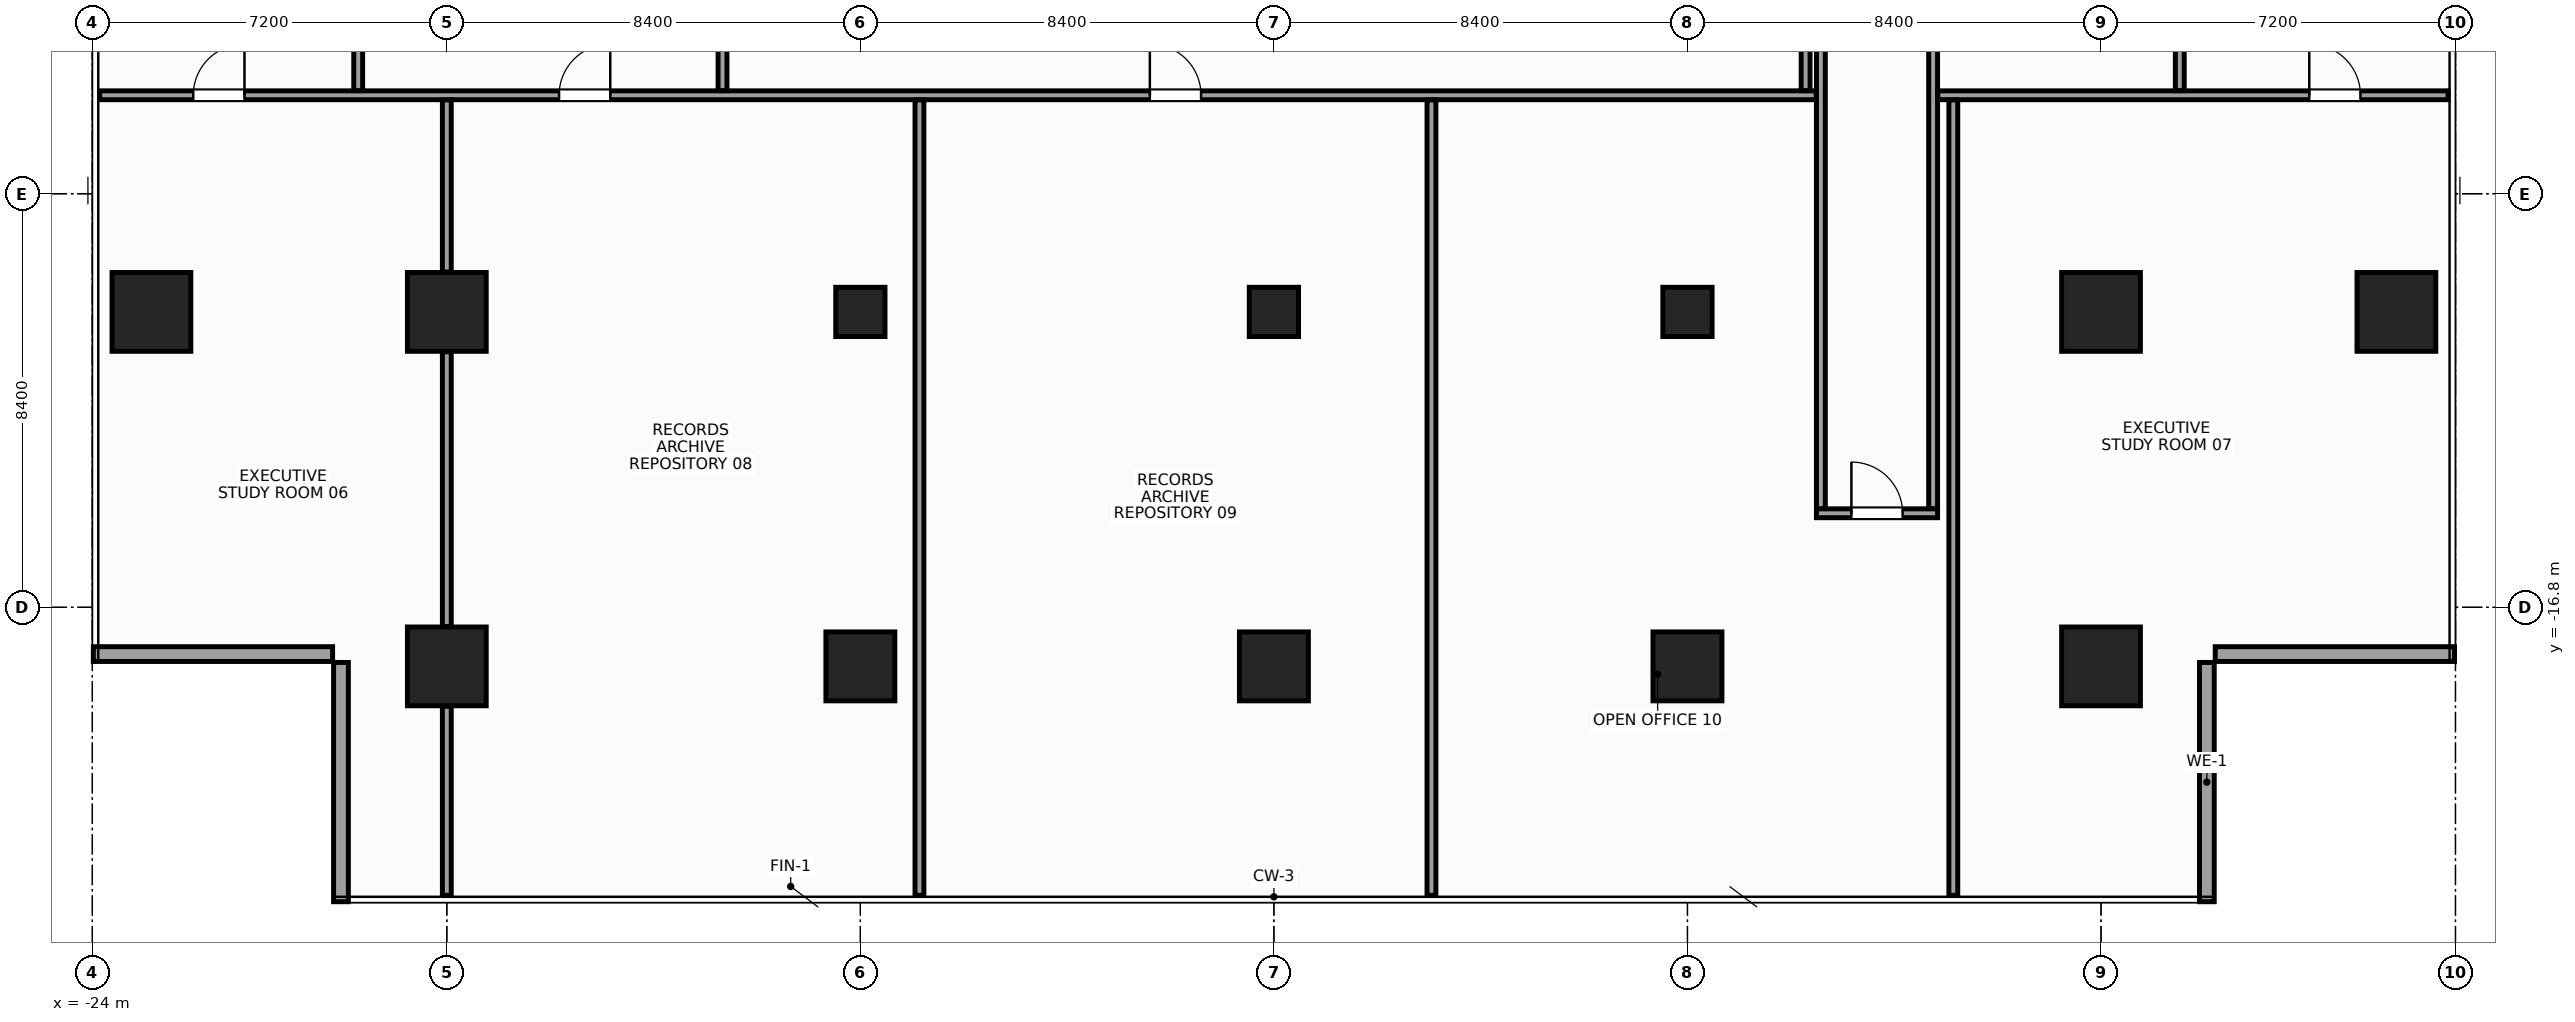
"""IFC4 building model, lengths in metres.
Left out: names, types, materials, properties, quantities, classifications, styles, units other than length and angle.
Written with IfcOpenShell. Run it as: python <this file> out.ifc"""

import sys

from ifc_helpers import new_model, si_unit, direction, frame, frame_2d, origin, origin_2d, place, context, subcontext, project, spatial, rectangle, hollow_rectangle, extrude, source, transform, mapped, element, fill, save


model = new_model("IFC4")
c1 = context("Model", 3, precision=1e-05, world=origin(), true_north=direction((0.0, 1.0)))
c2 = subcontext(c1, "Body", "Model", "MODEL_VIEW")
j1 = project(units=[si_unit("LENGTHUNIT", "METRE"), si_unit("PLANEANGLEUNIT", "RADIAN")], contexts=[c1])
p1 = place(None, origin())
s1 = spatial("IfcSite", under=j1, at=p1, CompositionType="ELEMENT")
p2 = place(p1, origin())
s2 = spatial("IfcBuilding", under=s1, at=p2, CompositionType="ELEMENT")
p3 = place(p2, frame((0.0, 0.0, 167.6)))
s3 = spatial("IfcBuildingStorey", under=s2, at=p3, CompositionType="ELEMENT", Elevation=167.6)
m1 = source(origin(), c2, "Body", "SweptSolid", [
    extrude(rectangle(XDim=1.6, YDim=1.6, at=origin_2d()), origin(), (0.0, 0.0, 1.0), 3.6),
])
for number, where, z_axis, x_axis in (
    (1, (-16.8, -18.0, 0.0), (0.0, 0.0, 1.0), (1.0, 0.0, 0.0)),
    (2, (-16.8, -10.8, 0.0), (0.0, 0.0, 1.0), (1.0, 0.0, 0.0)),
    (3, (16.8, -18.0, 0.0), (0.0, 0.0, 1.0), (1.0, 0.0, 0.0)),
    (4, (16.8, -10.8, 0.0), (0.0, 0.0, 1.0), (1.0, 0.0, 0.0)),
    (5, (-22.8, -10.8, 0.0), (0.0, 0.0, 1.0), (1.0, 0.0, 0.0)),
    (6, (22.8, -10.8, 0.0), (0.0, 0.0, 1.0), (1.0, 0.0, 0.0)),
):
    element("IfcColumn", number, at=place(p3, frame(where, z_axis=z_axis, x_axis=x_axis)), inside=s3, PredefinedType="COLUMN", context=c2, shape_type="MappedRepresentation", body=[
        mapped(m1, transform((0.0, 0.0, 0.0), x_axis=(1.0, 0.0, 0.0), y_axis=(0.0, 1.0, 0.0), z_axis=(0.0, 0.0, 1.0), scale=1.0)),
    ])
m2 = source(origin(), c2, "Body", "SweptSolid", [
    extrude(rectangle(XDim=1.4, YDim=1.4, at=origin_2d()), origin(), (0.0, 0.0, 1.0), 3.6),
])
p4 = place(p3, frame((-8.4, -18.0, 0.0), z_axis=(0.0, 0.0, 1.0), x_axis=(1.0, 0.0, 0.0)))
e7 = element("IfcColumn", 7, at=p4, inside=s3, PredefinedType="COLUMN", context=c2, shape_type="MappedRepresentation", body=[
    mapped(m2, transform((0.0, 0.0, 0.0), x_axis=(1.0, 0.0, 0.0), y_axis=(0.0, 1.0, 0.0), z_axis=(0.0, 0.0, 1.0), scale=1.0)),
])
m3 = source(origin(), c2, "Body", "SweptSolid", [
    extrude(hollow_rectangle(XDim=1.0, YDim=1.0, WallThickness=0.045, at=origin_2d()), origin(), (0.0, 0.0, 1.0), 3.6),
])
p5 = place(p3, frame((-8.4, -10.8, 0.0), z_axis=(0.0, 0.0, 1.0), x_axis=(1.0, 0.0, 0.0)))
e8 = element("IfcColumn", 8, at=p5, inside=s3, PredefinedType="COLUMN", context=c2, shape_type="MappedRepresentation", body=[
    mapped(m3, transform((0.0, 0.0, 0.0), x_axis=(1.0, 0.0, 0.0), y_axis=(0.0, 1.0, 0.0), z_axis=(0.0, 0.0, 1.0), scale=1.0)),
])
p6 = place(p3, frame((8.4, -18.0, 0.0), z_axis=(0.0, 0.0, 1.0), x_axis=(1.0, 0.0, 0.0)))
e9 = element("IfcColumn", 9, at=p6, inside=s3, PredefinedType="COLUMN", context=c2, shape_type="MappedRepresentation", body=[
    mapped(m2, transform((0.0, 0.0, 0.0), x_axis=(1.0, 0.0, 0.0), y_axis=(0.0, 1.0, 0.0), z_axis=(0.0, 0.0, 1.0), scale=1.0)),
])
p7 = place(p3, frame((8.4, -10.8, 0.0), z_axis=(0.0, 0.0, 1.0), x_axis=(1.0, 0.0, 0.0)))
e10 = element("IfcColumn", 10, at=p7, inside=s3, PredefinedType="COLUMN", context=c2, shape_type="MappedRepresentation", body=[
    mapped(m3, transform((0.0, 0.0, 0.0), x_axis=(1.0, 0.0, 0.0), y_axis=(0.0, 1.0, 0.0), z_axis=(0.0, 0.0, 1.0), scale=1.0)),
])
p8 = place(p3, frame((0.0, -18.0, 0.0), z_axis=(0.0, 0.0, 1.0), x_axis=(1.0, 0.0, 0.0)))
e11 = element("IfcColumn", 11, at=p8, inside=s3, PredefinedType="COLUMN", context=c2, shape_type="MappedRepresentation", body=[
    mapped(m2, transform((0.0, 0.0, 0.0), x_axis=(1.0, 0.0, 0.0), y_axis=(0.0, 1.0, 0.0), z_axis=(0.0, 0.0, 1.0), scale=1.0)),
])
m4 = source(origin(), c2, "Body", "SweptSolid", [
    extrude(rectangle(XDim=1.0, YDim=1.0, at=origin_2d()), origin(), (0.0, 0.0, 1.0), 3.6),
])
p9 = place(p3, frame((0.0, -10.8, 0.0), z_axis=(0.0, 0.0, 1.0), x_axis=(1.0, 0.0, 0.0)))
e12 = element("IfcColumn", 12, at=p9, inside=s3, PredefinedType="COLUMN", context=c2, shape_type="MappedRepresentation", body=[
    mapped(m4, transform((0.0, 0.0, 0.0), x_axis=(1.0, 0.0, 0.0), y_axis=(0.0, 1.0, 0.0), z_axis=(0.0, 0.0, 1.0), scale=1.0)),
])
m5 = source(origin(), c2, "Body", "SweptSolid", [
    extrude(rectangle(XDim=4.86, YDim=0.3, at=frame_2d((2.43, 0.0))), origin(), (0.0, 0.0, 1.0), 2.76),
])
p10 = place(p3, frame((18.95, -22.78, 0.0), z_axis=(0.0, 0.0, 1.0), x_axis=(0.0, 1.0, 0.0)))
e13 = element("IfcWall", 13, at=p10, inside=s3, PredefinedType="STANDARD", context=c2, shape_type="MappedRepresentation", body=[
    mapped(m5, transform((0.0, 0.0, 0.0), x_axis=(1.0, 0.0, 0.0), y_axis=(0.0, 1.0, 0.0), z_axis=(0.0, 0.0, 1.0), scale=1.0)),
])
m6 = source(origin(), c2, "Body", "SweptSolid", [
    extrude(rectangle(XDim=4.86, YDim=0.3, at=frame_2d((2.43, 0.0))), origin(), (0.0, 0.0, 1.0), 2.76),
])
for number, where, z_axis, x_axis in (
    (14, (19.12, -17.75, 0.0), (0.0, 0.0, 1.0), (1.0, 0.0, 0.0)),
    (15, (-23.98, -17.75, 0.0), (0.0, 0.0, 1.0), (1.0, 0.0, 0.0)),
):
    element("IfcWall", number, at=place(p3, frame(where, z_axis=z_axis, x_axis=x_axis)), inside=s3, PredefinedType="STANDARD", context=c2, shape_type="MappedRepresentation", body=[
        mapped(m6, transform((0.0, 0.0, 0.0), x_axis=(1.0, 0.0, 0.0), y_axis=(0.0, 1.0, 0.0), z_axis=(0.0, 0.0, 1.0), scale=1.0)),
    ])
p11 = place(p3, frame((-18.95, -17.92, 0.0), z_axis=(0.0, 0.0, 1.0), x_axis=(0.0, -1.0, 0.0)))
e16 = element("IfcWall", 16, at=p11, inside=s3, PredefinedType="STANDARD", context=c2, shape_type="MappedRepresentation", body=[
    mapped(m5, transform((0.0, 0.0, 0.0), x_axis=(1.0, 0.0, 0.0), y_axis=(0.0, 1.0, 0.0), z_axis=(0.0, 0.0, 1.0), scale=1.0)),
])
m7 = source(origin(), c2, "Body", "SweptSolid", [
    extrude(rectangle(XDim=2.46, YDim=0.18, at=frame_2d((1.23, 0.0))), origin(), (0.0, 0.0, 1.0), 3.38),
])
p12 = place(p3, frame((11.02, -14.89, 0.0), z_axis=(0.0, 0.0, 1.0), x_axis=(1.0, 0.0, 0.0)))
e17 = element("IfcWall", 17, at=p12, inside=s3, PredefinedType="PARTITIONING", context=c2, shape_type="MappedRepresentation", body=[
    mapped(m7, transform((0.0, 0.0, 0.0), x_axis=(1.0, 0.0, 0.0), y_axis=(0.0, 1.0, 0.0), z_axis=(0.0, 0.0, 1.0), scale=1.0)),
])
p13 = place(p12, frame((0.71, 0.0, 0.0)))
e18 = element("IfcOpeningElement", 18, at=p13, cuts=e17, PredefinedType="OPENING", context=c2, shape_type="SweptSolid", body=[
    extrude(rectangle(XDim=1.04, YDim=2.2, at=frame_2d((0.52, 1.1))), frame((0.0, 0.102, 0.0), z_axis=(0.0, -1.0, 0.0), x_axis=(1.0, 0.0, 0.0)), (0.0, 0.0, 1.0), 0.204),
])
m8 = source(origin(), c2, "Body", "SweptSolid", [
    extrude(rectangle(XDim=22.595, YDim=0.18, at=frame_2d((11.297, 0.0))), origin(), (0.0, 0.0, 1.0), 2.665),
])
for number, where, z_axis, x_axis in (
    (19, (11.11, -14.795, 0.0), (0.0, 0.0, 1.0), (0.0, 1.0, 0.0)),
    (20, (13.39, -14.795, 0.0), (0.0, 0.0, 1.0), (0.0, 1.0, 0.0)),
):
    element("IfcWall", number, at=place(p3, frame(where, z_axis=z_axis, x_axis=x_axis)), inside=s3, PredefinedType="PARTITIONING", context=c2, shape_type="MappedRepresentation", body=[
        mapped(m8, transform((0.0, 0.0, 0.0), x_axis=(1.0, 0.0, 0.0), y_axis=(0.0, 1.0, 0.0), z_axis=(0.0, 0.0, 1.0), scale=1.0)),
    ])
m9 = source(origin(), c2, "Body", "SweptSolid", [
    extrude(rectangle(XDim=34.865, YDim=0.18, at=frame_2d((17.433, 0.0))), origin(), (0.0, 0.0, 1.0), 2.765),
])
p14 = place(p3, frame((-23.85, -6.4, 0.0), z_axis=(0.0, 0.0, 1.0), x_axis=(1.0, 0.0, 0.0)))
e21 = element("IfcWall", 21, at=p14, inside=s3, PredefinedType="PARTITIONING", context=c2, shape_type="MappedRepresentation", body=[
    mapped(m9, transform((0.0, 0.0, 0.0), x_axis=(1.0, 0.0, 0.0), y_axis=(0.0, 1.0, 0.0), z_axis=(0.0, 0.0, 1.0), scale=1.0)),
])
p15 = place(p14, frame((1.9, 0.0, 0.0)))
e22 = element("IfcOpeningElement", 22, at=p15, cuts=e21, PredefinedType="OPENING", context=c2, shape_type="SweptSolid", body=[
    extrude(rectangle(XDim=1.04, YDim=2.2, at=frame_2d((0.52, 1.1))), frame((0.0, 0.102, 0.0), z_axis=(0.0, -1.0, 0.0), x_axis=(1.0, 0.0, 0.0)), (0.0, 0.0, 1.0), 0.204),
])
p16 = place(p14, frame((9.33, 0.0, 0.0)))
e23 = element("IfcOpeningElement", 23, at=p16, cuts=e21, PredefinedType="OPENING", context=c2, shape_type="SweptSolid", body=[
    extrude(rectangle(XDim=1.04, YDim=2.2, at=frame_2d((0.52, 1.1))), frame((0.0, 0.102, 0.0), z_axis=(0.0, -1.0, 0.0), x_axis=(1.0, 0.0, 0.0)), (0.0, 0.0, 1.0), 0.204),
])
p17 = place(p14, frame((21.33, 0.0, 0.0)))
e24 = element("IfcOpeningElement", 24, at=p17, cuts=e21, PredefinedType="OPENING", context=c2, shape_type="SweptSolid", body=[
    extrude(rectangle(XDim=1.04, YDim=2.2, at=frame_2d((0.52, 1.1))), frame((0.0, 0.102, 0.0), z_axis=(0.0, -1.0, 0.0), x_axis=(1.0, 0.0, 0.0)), (0.0, 0.0, 1.0), 0.204),
])
m10 = source(origin(), c2, "Body", "SweptSolid", [
    extrude(rectangle(XDim=10.365, YDim=0.18, at=frame_2d((5.183, 0.0))), origin(), (0.0, 0.0, 1.0), 2.765),
])
p18 = place(p3, frame((13.485, -6.4, 0.0), z_axis=(0.0, 0.0, 1.0), x_axis=(1.0, 0.0, 0.0)))
e25 = element("IfcWall", 25, at=p18, inside=s3, PredefinedType="PARTITIONING", context=c2, shape_type="MappedRepresentation", body=[
    mapped(m10, transform((0.0, 0.0, 0.0), x_axis=(1.0, 0.0, 0.0), y_axis=(0.0, 1.0, 0.0), z_axis=(0.0, 0.0, 1.0), scale=1.0)),
])
p19 = place(p18, frame((7.545, 0.0, 0.0)))
e26 = element("IfcOpeningElement", 26, at=p19, cuts=e25, PredefinedType="OPENING", context=c2, shape_type="SweptSolid", body=[
    extrude(rectangle(XDim=1.04, YDim=2.2, at=frame_2d((0.52, 1.1))), frame((0.0, 0.102, 0.0), z_axis=(0.0, -1.0, 0.0), x_axis=(1.0, 0.0, 0.0)), (0.0, 0.0, 1.0), 0.204),
])
m11 = source(origin(), c2, "Body", "SweptSolid", [
    extrude(rectangle(XDim=13.92, YDim=0.18, at=frame_2d((6.96, 0.0))), origin(), (0.0, 0.0, 1.0), 2.915),
])
p20 = place(p3, frame((-18.6, -6.305, 0.0), z_axis=(0.0, 0.0, 1.0), x_axis=(0.0, 1.0, 0.0)))
e27 = element("IfcWall", 27, at=p20, inside=s3, PredefinedType="PARTITIONING", context=c2, shape_type="MappedRepresentation", body=[
    mapped(m11, transform((0.0, 0.0, 0.0), x_axis=(1.0, 0.0, 0.0), y_axis=(0.0, 1.0, 0.0), z_axis=(0.0, 0.0, 1.0), scale=1.0)),
])
m12 = source(origin(), c2, "Body", "SweptSolid", [
    extrude(rectangle(XDim=13.92, YDim=0.18, at=frame_2d((6.96, 0.0))), origin(), (0.0, 0.0, 1.0), 2.665),
])
for number, where, z_axis, x_axis in (
    (28, (-11.2, -6.305, 0.0), (0.0, 0.0, 1.0), (0.0, 1.0, 0.0)),
    (29, (10.8, -6.305, 0.0), (0.0, 0.0, 1.0), (0.0, 1.0, 0.0)),
):
    element("IfcWall", number, at=place(p3, frame(where, z_axis=z_axis, x_axis=x_axis)), inside=s3, PredefinedType="PARTITIONING", context=c2, shape_type="MappedRepresentation", body=[
        mapped(m12, transform((0.0, 0.0, 0.0), x_axis=(1.0, 0.0, 0.0), y_axis=(0.0, 1.0, 0.0), z_axis=(0.0, 0.0, 1.0), scale=1.0)),
    ])
p21 = place(p3, frame((18.4, -6.305, 0.0), z_axis=(0.0, 0.0, 1.0), x_axis=(0.0, 1.0, 0.0)))
e30 = element("IfcWall", 30, at=p21, inside=s3, PredefinedType="PARTITIONING", context=c2, shape_type="MappedRepresentation", body=[
    mapped(m11, transform((0.0, 0.0, 0.0), x_axis=(1.0, 0.0, 0.0), y_axis=(0.0, 1.0, 0.0), z_axis=(0.0, 0.0, 1.0), scale=1.0)),
])
m13 = source(origin(), c2, "Body", "SweptSolid", [
    extrude(rectangle(XDim=3.84, YDim=0.18, at=frame_2d((1.92, 0.0))), origin(), (0.0, 0.0, 1.0), 3.38),
])
p22 = place(p3, frame((-16.8, -22.65, 0.0), z_axis=(0.0, 0.0, 1.0), x_axis=(0.0, 1.0, 0.0)))
e31 = element("IfcWall", 31, at=p22, inside=s3, PredefinedType="PARTITIONING", context=c2, shape_type="MappedRepresentation", body=[
    mapped(m13, transform((0.0, 0.0, 0.0), x_axis=(1.0, 0.0, 0.0), y_axis=(0.0, 1.0, 0.0), z_axis=(0.0, 0.0, 1.0), scale=1.0)),
])
m14 = source(origin(), c2, "Body", "SweptSolid", [
    extrude(rectangle(XDim=5.58, YDim=0.18, at=frame_2d((2.79, 0.0))), origin(), (0.0, 0.0, 1.0), 2.965),
])
p23 = place(p3, frame((-16.8, -17.19, 0.0), z_axis=(0.0, 0.0, 1.0), x_axis=(0.0, 1.0, 0.0)))
e32 = element("IfcWall", 32, at=p23, inside=s3, PredefinedType="PARTITIONING", context=c2, shape_type="MappedRepresentation", body=[
    mapped(m14, transform((0.0, 0.0, 0.0), x_axis=(1.0, 0.0, 0.0), y_axis=(0.0, 1.0, 0.0), z_axis=(0.0, 0.0, 1.0), scale=1.0)),
])
m15 = source(origin(), c2, "Body", "SweptSolid", [
    extrude(rectangle(XDim=3.495, YDim=0.18, at=frame_2d((1.748, 0.0))), origin(), (0.0, 0.0, 1.0), 2.765),
])
p24 = place(p3, frame((-16.8, -9.99, 0.0), z_axis=(0.0, 0.0, 1.0), x_axis=(0.0, 1.0, 0.0)))
e33 = element("IfcWall", 33, at=p24, inside=s3, PredefinedType="PARTITIONING", context=c2, shape_type="MappedRepresentation", body=[
    mapped(m15, transform((0.0, 0.0, 0.0), x_axis=(1.0, 0.0, 0.0), y_axis=(0.0, 1.0, 0.0), z_axis=(0.0, 0.0, 1.0), scale=1.0)),
])
m16 = source(origin(), c2, "Body", "SweptSolid", [
    extrude(rectangle(XDim=16.155, YDim=0.18, at=frame_2d((8.077, 0.0))), origin(), (0.0, 0.0, 1.0), 2.915),
])
for number, where, z_axis, x_axis in (
    (34, (-7.2, -22.65, 0.0), (0.0, 0.0, 1.0), (0.0, 1.0, 0.0)),
    (35, (3.2, -22.65, 0.0), (0.0, 0.0, 1.0), (0.0, 1.0, 0.0)),
    (36, (13.8, -22.65, 0.0), (0.0, 0.0, 1.0), (0.0, 1.0, 0.0)),
):
    element("IfcWall", number, at=place(p3, frame(where, z_axis=z_axis, x_axis=x_axis)), inside=s3, PredefinedType="PARTITIONING", context=c2, shape_type="MappedRepresentation", body=[
        mapped(m16, transform((0.0, 0.0, 0.0), x_axis=(1.0, 0.0, 0.0), y_axis=(0.0, 1.0, 0.0), z_axis=(0.0, 0.0, 1.0), scale=1.0)),
    ])
m17 = source(origin(), c2, "Body", "SweptSolid", [
    extrude(rectangle(XDim=1.04, YDim=2.2, at=frame_2d((0.52, 1.1))), frame((0.0, 0.025, 0.0), z_axis=(0.0, -1.0, 0.0), x_axis=(1.0, 0.0, 0.0)), (0.0, 0.0, 1.0), 0.05),
])
p25 = place(p13, origin())
e37 = element("IfcDoor", 37, at=p25, inside=s3, OperationType="SINGLE_SWING_LEFT", PredefinedType="DOOR", context=c2, shape_type="MappedRepresentation", body=[
    mapped(m17, transform((0.0, 0.0, 0.0), x_axis=(1.0, 0.0, 0.0), y_axis=(0.0, 1.0, 0.0), z_axis=(0.0, 0.0, 1.0), scale=1.0)),
])
fill(e18, e37)
p26 = place(p15, origin())
e38 = element("IfcDoor", 38, at=p26, inside=s3, OperationType="SINGLE_SWING_RIGHT", PredefinedType="DOOR", context=c2, shape_type="MappedRepresentation", body=[
    mapped(m17, transform((0.0, 0.0, 0.0), x_axis=(1.0, 0.0, 0.0), y_axis=(0.0, 1.0, 0.0), z_axis=(0.0, 0.0, 1.0), scale=1.0)),
])
fill(e22, e38)
p27 = place(p19, origin())
e39 = element("IfcDoor", 39, at=p27, inside=s3, OperationType="SINGLE_SWING_LEFT", PredefinedType="DOOR", context=c2, shape_type="MappedRepresentation", body=[
    mapped(m17, transform((0.0, 0.0, 0.0), x_axis=(1.0, 0.0, 0.0), y_axis=(0.0, 1.0, 0.0), z_axis=(0.0, 0.0, 1.0), scale=1.0)),
])
fill(e26, e39)
p28 = place(p16, origin())
e40 = element("IfcDoor", 40, at=p28, inside=s3, OperationType="SINGLE_SWING_RIGHT", PredefinedType="DOOR", context=c2, shape_type="MappedRepresentation", body=[
    mapped(m17, transform((0.0, 0.0, 0.0), x_axis=(1.0, 0.0, 0.0), y_axis=(0.0, 1.0, 0.0), z_axis=(0.0, 0.0, 1.0), scale=1.0)),
])
fill(e23, e40)
p29 = place(p17, origin())
e41 = element("IfcDoor", 41, at=p29, inside=s3, OperationType="SINGLE_SWING_LEFT", PredefinedType="DOOR", context=c2, shape_type="MappedRepresentation", body=[
    mapped(m17, transform((0.0, 0.0, 0.0), x_axis=(1.0, 0.0, 0.0), y_axis=(0.0, 1.0, 0.0), z_axis=(0.0, 0.0, 1.0), scale=1.0)),
])
fill(e24, e41)
save(model, sys.argv[1])
